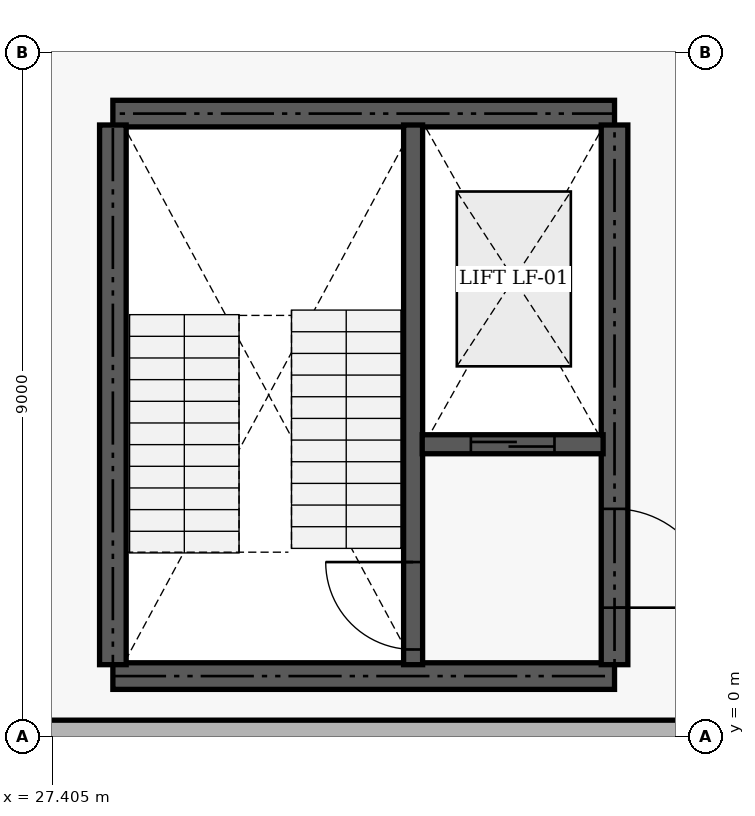
"""IFC4 building model, lengths in metres.
Left out: names, types, materials, properties, quantities, classifications, styles, units other than length and angle.
Written with IfcOpenShell. Run it as: python <this file> out.ifc"""

import sys

from ifc_helpers import new_model, si_unit, direction, frame, frame_2d, origin, place, context, subcontext, project, spatial, rectangle, extrude, element, fill, save


model = new_model("IFC4")
c1 = context("Model", 3, precision=1e-05, world=origin(), true_north=direction((0.0, 1.0)))
c2 = subcontext(c1, "Body", "Model", "MODEL_VIEW")
j1 = project(units=[si_unit("LENGTHUNIT", "METRE"), si_unit("PLANEANGLEUNIT", "RADIAN")], contexts=[c1])
p1 = place(None, origin())
s1 = spatial("IfcSite", under=j1, at=p1, CompositionType="ELEMENT")
p2 = place(p1, origin())
s2 = spatial("IfcBuilding", under=s1, at=p2, CompositionType="ELEMENT")
p3 = place(p2, frame((0.0, 0.0, 5.4)))
s3 = spatial("IfcBuildingStorey", under=s2, at=p3, CompositionType="ELEMENT", Elevation=5.4)
p4 = place(p3, frame((27.06, 0.0, 0.0), z_axis=(0.0, 0.0, 1.0), x_axis=(1.0, 0.0, 0.0)))
e1 = element("IfcWall", 1, at=p4, inside=s3, PredefinedType="SOLIDWALL", context=c2, shape_type="SweptSolid", body=[
    extrude(rectangle(XDim=8.88, YDim=0.44, at=frame_2d((4.44, 0.0))), origin(), (0.0, 0.0, 1.0), 3.5),
])
for number, where, z_axis, x_axis in (
    (2, (28.2, 0.8, 0.0), (0.0, 0.0, 1.0), (1.0, 0.0, 0.0)),
    (3, (28.2, 8.2, 0.0), (0.0, 0.0, 1.0), (1.0, 0.0, 0.0)),
):
    element("IfcWall", number, at=place(p3, frame(where, z_axis=z_axis, x_axis=x_axis)), inside=s3, PredefinedType="SHEAR", context=c2, shape_type="SweptSolid", body=[
        extrude(rectangle(XDim=6.6, YDim=0.35, at=frame_2d((3.3, 0.0))), origin(), (0.0, 0.0, 1.0), 4.2),
    ])
p5 = place(p3, frame((28.2, 0.95, 0.0), z_axis=(0.0, 0.0, 1.0), x_axis=(0.0, 1.0, 0.0)))
e4 = element("IfcWall", 4, at=p5, inside=s3, PredefinedType="SHEAR", context=c2, shape_type="SweptSolid", body=[
    extrude(rectangle(XDim=7.1, YDim=0.35, at=frame_2d((3.55, 0.0))), origin(), (0.0, 0.0, 1.0), 4.2),
])
p6 = place(p3, frame((34.8, 0.95, 0.0), z_axis=(0.0, 0.0, 1.0), x_axis=(0.0, 1.0, 0.0)))
e5 = element("IfcWall", 5, at=p6, inside=s3, PredefinedType="SHEAR", context=c2, shape_type="SweptSolid", body=[
    extrude(rectangle(XDim=7.1, YDim=0.35, at=frame_2d((3.55, 0.0))), origin(), (0.0, 0.0, 1.0), 4.2),
])
p7 = place(p6, frame((0.75, 0.0, 0.0)))
e6 = element("IfcOpeningElement", 6, at=p7, cuts=e5, PredefinedType="OPENING", context=c2, shape_type="SweptSolid", body=[
    extrude(rectangle(XDim=1.3, YDim=2.15, at=frame_2d((0.65, 1.075))), frame((0.0, 0.185, 0.0), z_axis=(0.0, -1.0, 0.0), x_axis=(1.0, 0.0, 0.0)), (0.0, 0.0, 1.0), 0.37),
])
p8 = place(p3, frame((32.15, 0.95, 0.0), z_axis=(0.0, 0.0, 1.0), x_axis=(0.0, 1.0, 0.0)))
e7 = element("IfcWall", 7, at=p8, inside=s3, PredefinedType="SHEAR", context=c2, shape_type="SweptSolid", body=[
    extrude(rectangle(XDim=7.1, YDim=0.25, at=frame_2d((3.55, 0.0))), origin(), (0.0, 0.0, 1.0), 4.2),
])
p9 = place(p8, frame((0.2, 0.0, 0.0)))
e8 = element("IfcOpeningElement", 8, at=p9, cuts=e7, PredefinedType="OPENING", context=c2, shape_type="SweptSolid", body=[
    extrude(rectangle(XDim=1.15, YDim=2.15, at=frame_2d((0.575, 1.075))), frame((0.0, 0.135, 0.0), z_axis=(0.0, -1.0, 0.0), x_axis=(1.0, 0.0, 0.0)), (0.0, 0.0, 1.0), 0.27),
])
p10 = place(p3, frame((32.27, 3.85, 0.0), z_axis=(0.0, 0.0, 1.0), x_axis=(1.0, 0.0, 0.0)))
e9 = element("IfcWall", 9, at=p10, inside=s3, PredefinedType="SHEAR", context=c2, shape_type="SweptSolid", body=[
    extrude(rectangle(XDim=2.38, YDim=0.25, at=frame_2d((1.19, 0.0))), origin(), (0.0, 0.0, 1.0), 4.2),
])
p11 = place(p10, frame((0.64, 0.0, 0.0)))
e10 = element("IfcOpeningElement", 10, at=p11, cuts=e9, PredefinedType="OPENING", context=c2, shape_type="SweptSolid", body=[
    extrude(rectangle(XDim=1.1, YDim=2.15, at=frame_2d((0.55, 1.075))), frame((0.0, 0.135, 0.0), z_axis=(0.0, -1.0, 0.0), x_axis=(1.0, 0.0, 0.0)), (0.0, 0.0, 1.0), 0.27),
])
p12 = place(p7, frame((1.3, 0.0, 0.0), z_axis=(0.0, 0.0, 1.0), x_axis=(-1.0, 0.0, 0.0)))
e11 = element("IfcDoor", 11, at=p12, inside=s3, OperationType="DOUBLE_DOOR_SINGLE_SWING", PredefinedType="DOOR", context=c2, shape_type="SweptSolid", body=[
    extrude(rectangle(XDim=1.3, YDim=2.15, at=frame_2d((0.65, 1.075))), frame((0.0, 0.025, 0.0), z_axis=(0.0, -1.0, 0.0), x_axis=(1.0, 0.0, 0.0)), (0.0, 0.0, 1.0), 0.05),
])
fill(e6, e11)
p13 = place(p9, frame((1.15, 0.0, 0.0), z_axis=(0.0, 0.0, 1.0), x_axis=(-1.0, 0.0, 0.0)))
e12 = element("IfcDoor", 12, at=p13, inside=s3, OperationType="SINGLE_SWING_RIGHT", PredefinedType="DOOR", context=c2, shape_type="SweptSolid", body=[
    extrude(rectangle(XDim=1.15, YDim=2.15, at=frame_2d((0.575, 1.075))), frame((0.0, 0.025, 0.0), z_axis=(0.0, -1.0, 0.0), x_axis=(1.0, 0.0, 0.0)), (0.0, 0.0, 1.0), 0.05),
])
fill(e8, e12)
p14 = place(p11, origin())
e13 = element("IfcDoor", 13, at=p14, inside=s3, OperationType="SLIDING_TO_LEFT", PredefinedType="DOOR", context=c2, shape_type="SweptSolid", body=[
    extrude(rectangle(XDim=1.1, YDim=2.15, at=frame_2d((0.55, 1.075))), frame((0.0, 0.025, 0.0), z_axis=(0.0, -1.0, 0.0), x_axis=(1.0, 0.0, 0.0)), (0.0, 0.0, 1.0), 0.05),
])
fill(e10, e13)
save(model, sys.argv[1])
